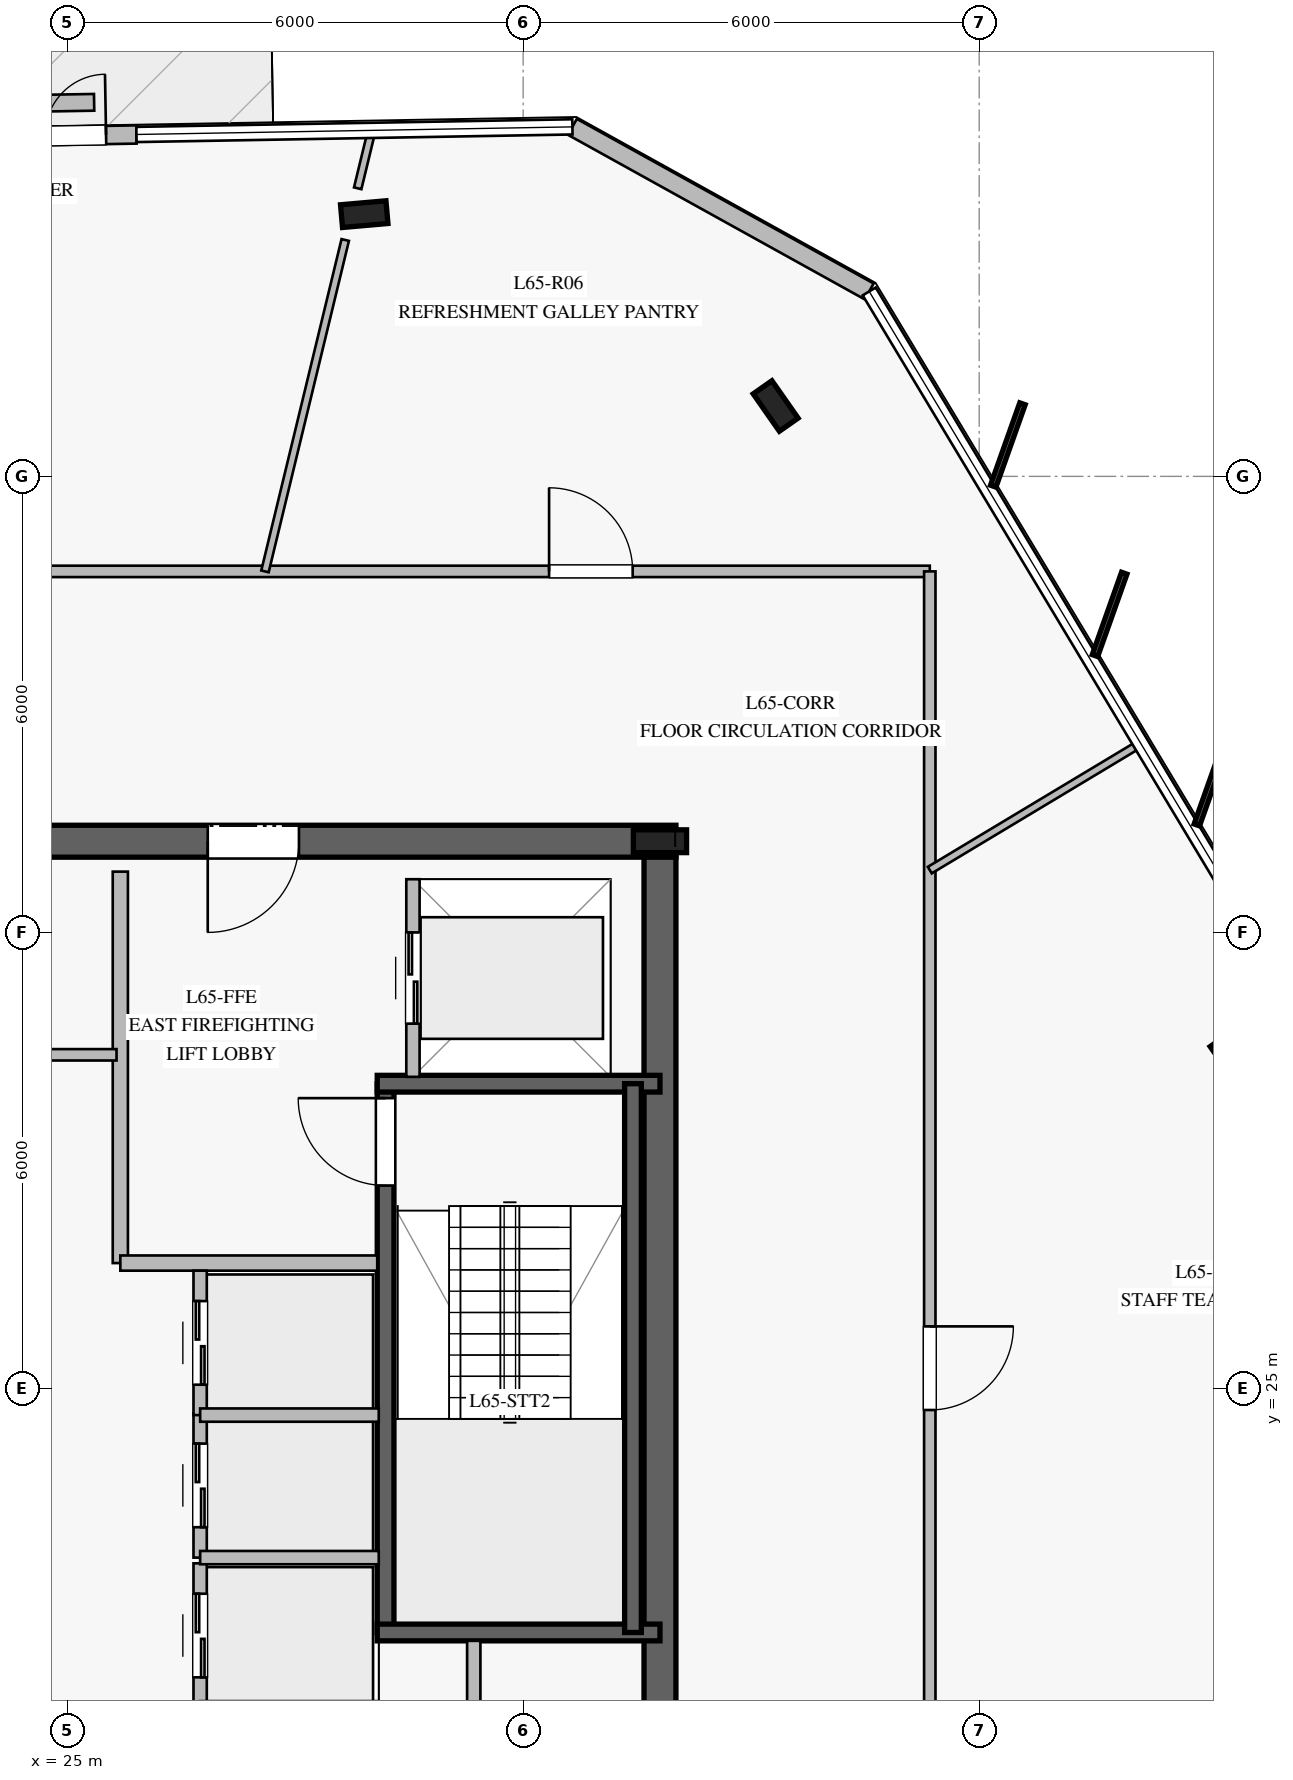
"""IFC4 building model, lengths in metres.
Left out: names, types, materials, properties, quantities, classifications, styles, units other than length and angle.
Written with IfcOpenShell. Run it as: python <this file> out.ifc"""

import sys

from ifc_helpers import new_model, si_unit, direction, frame, frame_2d, origin, origin_2d, place, context, subcontext, project, spatial, rectangle, i_section, extrude, element, fill, save


model = new_model("IFC4")
c1 = context("Model", 3, precision=1e-05, world=origin(), true_north=direction((0.0, 1.0)))
c2 = subcontext(c1, "Body", "Model", "MODEL_VIEW")
j1 = project(units=[si_unit("LENGTHUNIT", "METRE"), si_unit("PLANEANGLEUNIT", "RADIAN")], contexts=[c1])
p1 = place(None, origin())
s1 = spatial("IfcSite", under=j1, at=p1, CompositionType="ELEMENT")
p2 = place(p1, origin())
s2 = spatial("IfcBuilding", under=s1, at=p2, CompositionType="ELEMENT")
p3 = place(p2, frame((0.0, 0.0, 270.2)))
s3 = spatial("IfcBuildingStorey", under=s2, at=p3, CompositionType="ELEMENT", Elevation=270.2)
p4 = place(p3, frame((33.01, 32.2, 0.0), z_axis=(0.0, 0.0, 1.0), x_axis=(-1.0, 0.0, 0.0)))
e1 = element("IfcWall", 1, at=p4, inside=s3, PredefinedType="SHEAR", context=c2, shape_type="SweptSolid", body=[
    extrude(rectangle(XDim=16.02, YDim=0.42, at=frame_2d((8.01, 0.0))), origin(), (0.0, 0.0, 1.0), 3.78),
])
p5 = place(p4, frame((4.96, 0.0, 0.0)))
e2 = element("IfcOpeningElement", 2, at=p5, cuts=e1, PredefinedType="OPENING", context=c2, shape_type="SweptSolid", body=[
    extrude(rectangle(XDim=1.2, YDim=2.25, at=frame_2d((0.6, 1.125))), frame((0.0, 0.22, 0.0), z_axis=(0.0, -1.0, 0.0), x_axis=(1.0, 0.0, 0.0)), (0.0, 0.0, 1.0), 0.44),
])
p6 = place(p4, frame((9.785, 0.0, 0.0)))
e3 = element("IfcOpeningElement", 3, at=p6, cuts=e1, PredefinedType="OPENING", context=c2, shape_type="SweptSolid", body=[
    extrude(rectangle(XDim=1.1, YDim=2.2, at=frame_2d((0.55, 1.1))), frame((0.0, 0.22, 0.0), z_axis=(0.0, -1.0, 0.0), x_axis=(1.0, 0.0, 0.0)), (0.0, 0.0, 1.0), 0.44),
])
p7 = place(p3, frame((32.8, 18.01, 0.0), z_axis=(0.0, 0.0, 1.0), x_axis=(0.0, 1.0, 0.0)))
e4 = element("IfcWall", 4, at=p7, inside=s3, PredefinedType="SHEAR", context=c2, shape_type="SweptSolid", body=[
    extrude(rectangle(XDim=13.98, YDim=0.42, at=frame_2d((6.99, 0.0))), origin(), (0.0, 0.0, 1.0), 3.78),
])
p8 = place(p3, frame((32.8, 32.2, 0.0), z_axis=(0.0, 0.0, 1.0), x_axis=(1.0, 0.0, 0.0)))
e5 = element("IfcColumn", 5, at=p8, inside=s3, PredefinedType="COLUMN", context=c2, shape_type="SweptSolid", body=[
    extrude(i_section(OverallWidth=0.3, OverallDepth=0.7, WebThickness=0.017, FlangeThickness=0.032, at=origin_2d()), origin(), (0.0, 0.0, 1.0), 4.0),
])
p9 = place(p3, frame((29.19, 21.79, 0.0), z_axis=(0.0, 0.0, 1.0), x_axis=(0.0, 1.0, 0.0)))
e6 = element("IfcWall", 6, at=p9, inside=s3, PredefinedType="SOLIDWALL", context=c2, shape_type="SweptSolid", body=[
    extrude(rectangle(XDim=7.22, YDim=0.22, at=frame_2d((3.61, 0.0))), origin(), (0.0, 0.0, 1.0), 3.78),
])
p10 = place(p9, frame((5.88, 0.0, 0.0)))
e7 = element("IfcOpeningElement", 7, at=p10, cuts=e6, PredefinedType="OPENING", context=c2, shape_type="SweptSolid", body=[
    extrude(rectangle(XDim=1.15, YDim=2.2, at=frame_2d((0.575, 1.1))), frame((0.0, 0.12, 0.0), z_axis=(0.0, -1.0, 0.0), x_axis=(1.0, 0.0, 0.0)), (0.0, 0.0, 1.0), 0.24),
])
for number, where, z_axis, x_axis in (
    (8, (29.08, 21.79, 0.0), (0.0, 0.0, 1.0), (1.0, 0.0, 0.0)),
    (9, (29.08, 29.01, 0.0), (0.0, 0.0, 1.0), (1.0, 0.0, 0.0)),
):
    element("IfcWall", number, at=place(p3, frame(where, z_axis=z_axis, x_axis=x_axis)), inside=s3, PredefinedType="SOLIDWALL", context=c2, shape_type="SweptSolid", body=[
        extrude(rectangle(XDim=3.72, YDim=0.22, at=frame_2d((1.86, 0.0))), origin(), (0.0, 0.0, 1.0), 3.78),
    ])
p11 = place(p3, frame((32.445, 29.01, 0.0), z_axis=(0.0, 0.0, 1.0), x_axis=(0.0, -1.0, 0.0)))
e10 = element("IfcWall", 10, at=p11, inside=s3, PredefinedType="SOLIDWALL", context=c2, shape_type="SweptSolid", body=[
    extrude(rectangle(XDim=7.22, YDim=0.22, at=frame_2d((3.61, 0.0))), origin(), (0.0, 0.0, 1.0), 3.78),
])
for number, where, z_axis, x_axis in (
    (11, (28.909, 40.45, 0.0), (0.0, 0.0, 1.0), (0.996, 0.087, 0.0)),
    (12, (40.334, 29.339, 0.0), (0.0, 0.0, 1.0), (-0.574, 0.819, 0.0)),
    (13, (34.322, 37.926, 0.0), (0.0, 0.0, 1.0), (-0.574, 0.819, 0.0)),
):
    element("IfcColumn", number, at=place(p3, frame(where, z_axis=z_axis, x_axis=x_axis)), inside=s3, PredefinedType="COLUMN", context=c2, shape_type="SweptSolid", body=[
        extrude(i_section(OverallWidth=0.3, OverallDepth=0.6, WebThickness=0.015, FlangeThickness=0.03, at=origin_2d()), origin(), (0.0, 0.0, 1.0), 4.0),
    ])
p12 = place(p3, frame((25.912, 41.498, 0.0), z_axis=(0.0, 0.0, 1.0), x_axis=(-0.999846985771, -0.017492999853, 0.0)))
e14 = element("IfcWall", 14, at=p12, inside=s3, PredefinedType="STANDARD", context=c2, shape_type="SweptSolid", body=[
    extrude(rectangle(XDim=2.401, YDim=0.24, at=frame_2d((1.2, 0.0))), origin(), (0.0, 0.0, 1.0), 3.78),
])
p13 = place(p12, frame((0.4, 0.0, 0.0)))
e15 = element("IfcOpeningElement", 15, at=p13, cuts=e14, PredefinedType="OPENING", context=c2, shape_type="SweptSolid", body=[
    extrude(rectangle(XDim=1.6, YDim=2.25, at=frame_2d((0.8, 1.125))), frame((0.0, 0.13, 0.0), z_axis=(0.0, -1.0, 0.0), x_axis=(1.0, 0.0, 0.0)), (0.0, 0.0, 1.0), 0.26),
])
p14 = place(p3, frame((35.553, 39.433, 0.0), z_axis=(0.0, 0.0, 1.0), x_axis=(-0.874600538514, 0.48484419975, 0.0)))
e16 = element("IfcWall", 16, at=p14, inside=s3, PredefinedType="STANDARD", context=c2, shape_type="SweptSolid", body=[
    extrude(rectangle(XDim=4.465, YDim=0.24, at=frame_2d((2.232, 0.0))), origin(), (0.0, 0.0, 1.0), 3.78),
])
p15 = place(p3, frame((25.355, 41.921, 0.0), z_axis=(0.0, 0.0, 1.0), x_axis=(-0.999857201789, -0.01689899496, 0.0)))
e17 = element("IfcWall", 17, at=p15, inside=s3, PredefinedType="USERDEFINED", context=c2, shape_type="SweptSolid", body=[
    extrude(rectangle(XDim=1.3, YDim=0.22, at=frame_2d((0.65, 0.0))), origin(), (0.0, 0.0, 1.0), 0.4),
])
p16 = place(p3, frame((25.7, 26.65, 0.0), z_axis=(0.0, 0.0, 1.0), x_axis=(0.0, 1.0, 0.0)))
e18 = element("IfcWall", 18, at=p16, inside=s3, PredefinedType="PARTITIONING", context=c2, shape_type="SweptSolid", body=[
    extrude(rectangle(XDim=5.15, YDim=0.2, at=frame_2d((2.575, 0.0))), origin(), (0.0, 0.0, 1.0), 3.78),
])
p17 = place(p3, frame((25.7, 26.65, 0.0), z_axis=(0.0, 0.0, 1.0), x_axis=(1.0, 0.0, 0.0)))
e19 = element("IfcWall", 19, at=p17, inside=s3, PredefinedType="PARTITIONING", context=c2, shape_type="SweptSolid", body=[
    extrude(rectangle(XDim=3.38, YDim=0.2, at=frame_2d((1.69, 0.0))), origin(), (0.0, 0.0, 1.0), 3.78),
])
p18 = place(p3, frame((30.35, 18.2, 0.0), z_axis=(0.0, 0.0, 1.0), x_axis=(0.0, 1.0, 0.0)))
e20 = element("IfcWall", 20, at=p18, inside=s3, PredefinedType="PARTITIONING", context=c2, shape_type="SweptSolid", body=[
    extrude(rectangle(XDim=3.48, YDim=0.175, at=frame_2d((1.74, 0.0))), origin(), (0.0, 0.0, 1.0), 3.78),
])
p19 = place(p3, frame((19.75, 29.39, 0.0), z_axis=(0.0, 0.0, 1.0), x_axis=(1.0, 0.0, 0.0)))
e21 = element("IfcWall", 21, at=p19, inside=s3, PredefinedType="PARTITIONING", context=c2, shape_type="SweptSolid", body=[
    extrude(rectangle(XDim=5.9, YDim=0.15, at=frame_2d((2.95, 0.0))), origin(), (0.0, 0.0, 1.0), 3.78),
])
p20 = place(p3, frame((26.75, 20.8, 0.0), z_axis=(0.0, 0.0, 1.0), x_axis=(0.0, 1.0, 0.0)))
e22 = element("IfcWall", 22, at=p20, inside=s3, PredefinedType="PARTITIONING", context=c2, shape_type="SweptSolid", body=[
    extrude(rectangle(XDim=1.9, YDim=0.175, at=frame_2d((0.95, 0.0))), origin(), (0.0, 0.0, 1.0), 3.78),
])
p21 = place(p20, frame((0.4, 0.0, 0.0)))
e23 = element("IfcOpeningElement", 23, at=p21, cuts=e22, PredefinedType="OPENING", context=c2, shape_type="SweptSolid", body=[
    extrude(rectangle(XDim=1.1, YDim=2.2, at=frame_2d((0.55, 1.1))), frame((0.0, 0.098, 0.0), z_axis=(0.0, -1.0, 0.0), x_axis=(1.0, 0.0, 0.0)), (0.0, 0.0, 1.0), 0.195),
])
p22 = place(p3, frame((26.75, 22.775, 0.0), z_axis=(0.0, 0.0, 1.0), x_axis=(0.0, 1.0, 0.0)))
e24 = element("IfcWall", 24, at=p22, inside=s3, PredefinedType="PARTITIONING", context=c2, shape_type="SweptSolid", body=[
    extrude(rectangle(XDim=1.9, YDim=0.175, at=frame_2d((0.95, 0.0))), origin(), (0.0, 0.0, 1.0), 3.78),
])
p23 = place(p22, frame((0.4, 0.0, 0.0)))
e25 = element("IfcOpeningElement", 25, at=p23, cuts=e24, PredefinedType="OPENING", context=c2, shape_type="SweptSolid", body=[
    extrude(rectangle(XDim=1.1, YDim=2.2, at=frame_2d((0.55, 1.1))), frame((0.0, 0.098, 0.0), z_axis=(0.0, -1.0, 0.0), x_axis=(1.0, 0.0, 0.0)), (0.0, 0.0, 1.0), 0.195),
])
p24 = place(p3, frame((26.75, 22.775, 0.0), z_axis=(0.0, 0.0, 1.0), x_axis=(1.0, 0.0, 0.0)))
e26 = element("IfcWall", 26, at=p24, inside=s3, PredefinedType="PARTITIONING", context=c2, shape_type="SweptSolid", body=[
    extrude(rectangle(XDim=2.35, YDim=0.175, at=frame_2d((1.175, 0.0))), origin(), (0.0, 0.0, 1.0), 3.78),
])
p25 = place(p3, frame((26.75, 24.65, 0.0), z_axis=(0.0, 0.0, 1.0), x_axis=(0.0, 1.0, 0.0)))
e27 = element("IfcWall", 27, at=p25, inside=s3, PredefinedType="PARTITIONING", context=c2, shape_type="SweptSolid", body=[
    extrude(rectangle(XDim=1.9, YDim=0.175, at=frame_2d((0.95, 0.0))), origin(), (0.0, 0.0, 1.0), 3.78),
])
p26 = place(p25, frame((0.4, 0.0, 0.0)))
e28 = element("IfcOpeningElement", 28, at=p26, cuts=e27, PredefinedType="OPENING", context=c2, shape_type="SweptSolid", body=[
    extrude(rectangle(XDim=1.1, YDim=2.2, at=frame_2d((0.55, 1.1))), frame((0.0, 0.098, 0.0), z_axis=(0.0, -1.0, 0.0), x_axis=(1.0, 0.0, 0.0)), (0.0, 0.0, 1.0), 0.195),
])
p27 = place(p3, frame((26.75, 24.65, 0.0), z_axis=(0.0, 0.0, 1.0), x_axis=(1.0, 0.0, 0.0)))
e29 = element("IfcWall", 29, at=p27, inside=s3, PredefinedType="PARTITIONING", context=c2, shape_type="SweptSolid", body=[
    extrude(rectangle(XDim=2.35, YDim=0.175, at=frame_2d((1.175, 0.0))), origin(), (0.0, 0.0, 1.0), 3.78),
])
p28 = place(p3, frame((29.55, 29.1, 0.0), z_axis=(0.0, 0.0, 1.0), x_axis=(0.0, 1.0, 0.0)))
e30 = element("IfcWall", 30, at=p28, inside=s3, PredefinedType="PARTITIONING", context=c2, shape_type="SweptSolid", body=[
    extrude(rectangle(XDim=2.6, YDim=0.175, at=frame_2d((1.3, 0.0))), origin(), (0.0, 0.0, 1.0), 3.78),
])
p29 = place(p28, frame((0.7, 0.0, 0.0)))
e31 = element("IfcOpeningElement", 31, at=p29, cuts=e30, PredefinedType="OPENING", context=c2, shape_type="SweptSolid", body=[
    extrude(rectangle(XDim=1.2, YDim=2.2, at=frame_2d((0.6, 1.1))), frame((0.0, 0.098, 0.0), z_axis=(0.0, -1.0, 0.0), x_axis=(1.0, 0.0, 0.0)), (0.0, 0.0, 1.0), 0.195),
])
p30 = place(p3, frame((13.65, 35.75, 0.0), z_axis=(0.0, 0.0, 1.0), x_axis=(1.0, 0.0, 0.0)))
e32 = element("IfcWall", 32, at=p30, inside=s3, PredefinedType="PARTITIONING", context=c2, shape_type="SweptSolid", body=[
    extrude(rectangle(XDim=22.7, YDim=0.15, at=frame_2d((11.35, 0.0))), origin(), (0.0, 0.0, 1.0), 3.02),
])
p31 = place(p30, frame((9.721, 0.0, 0.0)))
e33 = element("IfcOpeningElement", 33, at=p31, cuts=e32, PredefinedType="OPENING", context=c2, shape_type="SweptSolid", body=[
    extrude(rectangle(XDim=1.1, YDim=2.2, at=frame_2d((0.55, 1.1))), frame((0.0, 0.085, 0.0), z_axis=(0.0, -1.0, 0.0), x_axis=(1.0, 0.0, 0.0)), (0.0, 0.0, 1.0), 0.17),
])
p32 = place(p30, frame((17.691, 0.0, 0.0)))
e34 = element("IfcOpeningElement", 34, at=p32, cuts=e32, PredefinedType="OPENING", context=c2, shape_type="SweptSolid", body=[
    extrude(rectangle(XDim=1.1, YDim=2.2, at=frame_2d((0.55, 1.1))), frame((0.0, 0.085, 0.0), z_axis=(0.0, -1.0, 0.0), x_axis=(1.0, 0.0, 0.0)), (0.0, 0.0, 1.0), 0.17),
])
p33 = place(p30, frame((2.828, 0.0, 0.0)))
e35 = element("IfcOpeningElement", 35, at=p33, cuts=e32, PredefinedType="OPENING", context=c2, shape_type="SweptSolid", body=[
    extrude(rectangle(XDim=1.1, YDim=2.2, at=frame_2d((0.55, 1.1))), frame((0.0, 0.085, 0.0), z_axis=(0.0, -1.0, 0.0), x_axis=(1.0, 0.0, 0.0)), (0.0, 0.0, 1.0), 0.17),
])
p34 = place(p3, frame((36.35, 35.75, 0.0), z_axis=(0.0, 0.0, 1.0), x_axis=(0.0, -1.0, 0.0)))
e36 = element("IfcWall", 36, at=p34, inside=s3, PredefinedType="PARTITIONING", context=c2, shape_type="SweptSolid", body=[
    extrude(rectangle(XDim=21.5, YDim=0.15, at=frame_2d((10.75, 0.0))), origin(), (0.0, 0.0, 1.0), 3.25),
])
p35 = place(p34, frame((18.648, 0.0, 0.0)))
e37 = element("IfcOpeningElement", 37, at=p35, cuts=e36, PredefinedType="OPENING", context=c2, shape_type="SweptSolid", body=[
    extrude(rectangle(XDim=1.1, YDim=2.2, at=frame_2d((0.55, 1.1))), frame((0.0, 0.085, 0.0), z_axis=(0.0, -1.0, 0.0), x_axis=(1.0, 0.0, 0.0)), (0.0, 0.0, 1.0), 0.17),
])
p36 = place(p34, frame((9.933, 0.0, 0.0)))
e38 = element("IfcOpeningElement", 38, at=p36, cuts=e36, PredefinedType="OPENING", context=c2, shape_type="SweptSolid", body=[
    extrude(rectangle(XDim=1.1, YDim=2.2, at=frame_2d((0.55, 1.1))), frame((0.0, 0.085, 0.0), z_axis=(0.0, -1.0, 0.0), x_axis=(1.0, 0.0, 0.0)), (0.0, 0.0, 1.0), 0.17),
])
p37 = place(p3, frame((36.35, 31.82, 0.0), z_axis=(0.0, 0.0, 1.0), x_axis=(0.85725213213, 0.514896865361, 0.0)))
e39 = element("IfcWall", 39, at=p37, inside=s3, PredefinedType="MOVABLE", context=c2, shape_type="SweptSolid", body=[
    extrude(rectangle(XDim=3.222, YDim=0.1, at=frame_2d((1.611, 0.0))), origin(), (0.0, 0.0, 1.0), 3.28),
])
p38 = place(p3, frame((27.603, 35.75, 0.0), z_axis=(0.0, 0.0, 1.0), x_axis=(0.235371054184, 0.971905585359, 0.0)))
e40 = element("IfcWall", 40, at=p38, inside=s3, PredefinedType="MOVABLE", context=c2, shape_type="SweptSolid", body=[
    extrude(rectangle(XDim=4.486, YDim=0.1, at=frame_2d((2.243, 0.0))), origin(), (0.0, 0.0, 1.0), 3.02),
])
p39 = place(p3, frame((28.823, 40.79, 0.0), z_axis=(0.0, 0.0, 1.0), x_axis=(0.235718383404, 0.971821405262, 0.0)))
e41 = element("IfcWall", 41, at=p39, inside=s3, PredefinedType="MOVABLE", context=c2, shape_type="SweptSolid", body=[
    extrude(rectangle(XDim=0.768, YDim=0.1, at=frame_2d((0.384, 0.0))), origin(), (0.0, 0.0, 1.0), 3.78),
])
p40 = place(p13, frame((1.6, 0.0, 0.0), z_axis=(0.0, 0.0, 1.0), x_axis=(-1.0, 0.0, 0.0)))
e42 = element("IfcDoor", 42, at=p40, inside=s3, OperationType="DOUBLE_DOOR_SINGLE_SWING", PredefinedType="DOOR", context=c2, shape_type="SweptSolid", body=[
    extrude(rectangle(XDim=1.6, YDim=2.25, at=frame_2d((0.8, 1.125))), frame((0.0, 0.025, 0.0), z_axis=(0.0, -1.0, 0.0), x_axis=(1.0, 0.0, 0.0)), (0.0, 0.0, 1.0), 0.05),
])
fill(e15, e42)
p41 = place(p10, origin())
e43 = element("IfcDoor", 43, at=p41, inside=s3, OperationType="SINGLE_SWING_RIGHT", PredefinedType="DOOR", context=c2, shape_type="SweptSolid", body=[
    extrude(rectangle(XDim=1.15, YDim=2.2, at=frame_2d((0.575, 1.1))), frame((0.0, 0.025, 0.0), z_axis=(0.0, -1.0, 0.0), x_axis=(1.0, 0.0, 0.0)), (0.0, 0.0, 1.0), 0.05),
])
fill(e7, e43)
p42 = place(p5, origin())
e44 = element("IfcDoor", 44, at=p42, inside=s3, OperationType="SINGLE_SWING_RIGHT", PredefinedType="DOOR", context=c2, shape_type="SweptSolid", body=[
    extrude(rectangle(XDim=1.2, YDim=2.25, at=frame_2d((0.6, 1.125))), frame((0.0, 0.025, 0.0), z_axis=(0.0, -1.0, 0.0), x_axis=(1.0, 0.0, 0.0)), (0.0, 0.0, 1.0), 0.05),
])
fill(e2, e44)
p43 = place(p21, origin())
e45 = element("IfcDoor", 45, at=p43, inside=s3, OperationType="DOUBLE_DOOR_SLIDING", PredefinedType="DOOR", context=c2, shape_type="SweptSolid", body=[
    extrude(rectangle(XDim=1.1, YDim=2.2, at=frame_2d((0.55, 1.1))), frame((0.0, 0.025, 0.0), z_axis=(0.0, -1.0, 0.0), x_axis=(1.0, 0.0, 0.0)), (0.0, 0.0, 1.0), 0.05),
])
fill(e23, e45)
p44 = place(p23, origin())
e46 = element("IfcDoor", 46, at=p44, inside=s3, OperationType="DOUBLE_DOOR_SLIDING", PredefinedType="DOOR", context=c2, shape_type="SweptSolid", body=[
    extrude(rectangle(XDim=1.1, YDim=2.2, at=frame_2d((0.55, 1.1))), frame((0.0, 0.025, 0.0), z_axis=(0.0, -1.0, 0.0), x_axis=(1.0, 0.0, 0.0)), (0.0, 0.0, 1.0), 0.05),
])
fill(e25, e46)
p45 = place(p26, origin())
e47 = element("IfcDoor", 47, at=p45, inside=s3, OperationType="DOUBLE_DOOR_SLIDING", PredefinedType="DOOR", context=c2, shape_type="SweptSolid", body=[
    extrude(rectangle(XDim=1.1, YDim=2.2, at=frame_2d((0.55, 1.1))), frame((0.0, 0.025, 0.0), z_axis=(0.0, -1.0, 0.0), x_axis=(1.0, 0.0, 0.0)), (0.0, 0.0, 1.0), 0.05),
])
fill(e28, e47)
p46 = place(p29, origin())
e48 = element("IfcDoor", 48, at=p46, inside=s3, OperationType="DOUBLE_DOOR_SLIDING", PredefinedType="DOOR", context=c2, shape_type="SweptSolid", body=[
    extrude(rectangle(XDim=1.2, YDim=2.2, at=frame_2d((0.6, 1.1))), frame((0.0, 0.025, 0.0), z_axis=(0.0, -1.0, 0.0), x_axis=(1.0, 0.0, 0.0)), (0.0, 0.0, 1.0), 0.05),
])
fill(e31, e48)
p47 = place(p36, origin())
e49 = element("IfcDoor", 49, at=p47, inside=s3, OperationType="SINGLE_SWING_LEFT", PredefinedType="DOOR", context=c2, shape_type="SweptSolid", body=[
    extrude(rectangle(XDim=1.1, YDim=2.2, at=frame_2d((0.55, 1.1))), frame((0.0, 0.025, 0.0), z_axis=(0.0, -1.0, 0.0), x_axis=(1.0, 0.0, 0.0)), (0.0, 0.0, 1.0), 0.05),
])
fill(e38, e49)
p48 = place(p32, origin())
e50 = element("IfcDoor", 50, at=p48, inside=s3, OperationType="SINGLE_SWING_LEFT", PredefinedType="DOOR", context=c2, shape_type="SweptSolid", body=[
    extrude(rectangle(XDim=1.1, YDim=2.2, at=frame_2d((0.55, 1.1))), frame((0.0, 0.025, 0.0), z_axis=(0.0, -1.0, 0.0), x_axis=(1.0, 0.0, 0.0)), (0.0, 0.0, 1.0), 0.05),
])
fill(e34, e50)
save(model, sys.argv[1])
